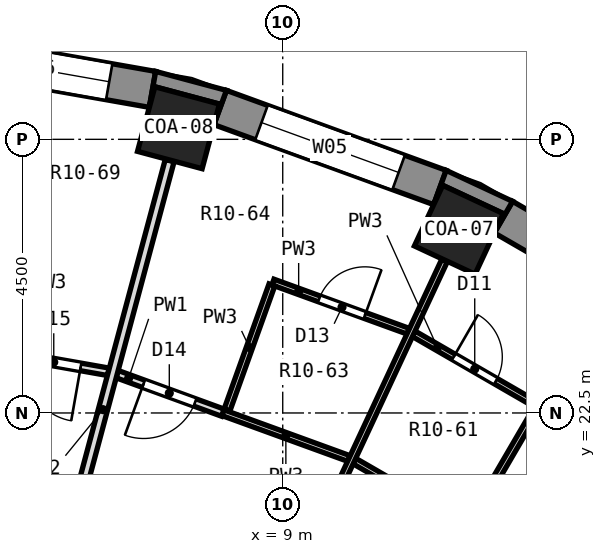
"""IFC4 building model, lengths in metres.
Left out: names, types, materials, properties, quantities, classifications, styles, units other than length and angle.
Written with IfcOpenShell. Run it as: python <this file> out.ifc"""

import sys

from ifc_helpers import new_model, si_unit, direction, frame, frame_2d, origin, origin_2d, place, context, subcontext, project, spatial, polyline, rectangle, outline, extrude, element, fill, save


model = new_model("IFC4")
c1 = context("Model", 3, precision=1e-05, world=origin(), true_north=direction((0.0, 1.0)))
c2 = subcontext(c1, "Body", "Model", "MODEL_VIEW")
j1 = project(units=[si_unit("LENGTHUNIT", "METRE"), si_unit("PLANEANGLEUNIT", "RADIAN")], contexts=[c1])
p1 = place(None, origin())
s1 = spatial("IfcSite", under=j1, at=p1, CompositionType="ELEMENT")
p2 = place(p1, origin())
s2 = spatial("IfcBuilding", under=s1, at=p2, CompositionType="ELEMENT")
p3 = place(p2, frame((0.0, 0.0, 36.2)))
s3 = spatial("IfcBuildingStorey", under=s2, at=p3, CompositionType="ELEMENT", Elevation=36.2)
for number, where, z_axis, x_axis in (
    (1, (11.897, 25.512, 0.0), (0.0, 0.0, 1.0), (0.423, 0.906, 0.0)),
    (2, (7.286, 27.191, 0.0), (0.0, 0.0, 1.0), (0.259, 0.966, 0.0)),
):
    element("IfcColumn", number, at=place(p3, frame(where, z_axis=z_axis, x_axis=x_axis)), inside=s3, PredefinedType="COLUMN", context=c2, shape_type="SweptSolid", body=[
        extrude(rectangle(XDim=1.1, YDim=1.1, at=origin_2d()), origin(), (0.0, 0.0, 1.0), 3.3),
    ])
p4 = place(p3, frame((15.96, 23.798, 0.0), z_axis=(0.0, 0.0, 1.0), x_axis=(-0.86603124159, 0.499989888488, 0.0)))
e3 = element("IfcWall", 3, at=p4, inside=s3, PredefinedType="SOLIDWALL", context=c2, shape_type="SweptSolid", body=[
    extrude(rectangle(XDim=3.846, YDim=0.6, at=frame_2d((1.923, 0.0))), origin(), (0.0, 0.0, 1.0), 2.75),
])
p5 = place(p4, frame((0.723, 0.0, 0.9)))
e4 = element("IfcOpeningElement", 4, at=p5, cuts=e3, PredefinedType="OPENING", context=c2, shape_type="SweptSolid", body=[
    extrude(rectangle(XDim=2.4, YDim=1.8, at=frame_2d((1.2, 0.9))), frame((0.0, 0.312, 0.0), z_axis=(0.0, -1.0, 0.0), x_axis=(1.0, 0.0, 0.0)), (0.0, 0.0, 1.0), 0.624),
])
p6 = place(p3, frame((11.585, 26.208, 0.0), z_axis=(0.0, 0.0, 1.0), x_axis=(-0.939689588564, 0.342028474173, 0.0)))
e5 = element("IfcWall", 5, at=p6, inside=s3, PredefinedType="SOLIDWALL", context=c2, shape_type="SweptSolid", body=[
    extrude(rectangle(XDim=3.846, YDim=0.6, at=frame_2d((1.923, 0.0))), origin(), (0.0, 0.0, 1.0), 2.75),
])
p7 = place(p6, frame((0.723, 0.0, 0.9)))
e6 = element("IfcOpeningElement", 6, at=p7, cuts=e5, PredefinedType="OPENING", context=c2, shape_type="SweptSolid", body=[
    extrude(rectangle(XDim=2.4, YDim=1.8, at=frame_2d((1.2, 0.9))), frame((0.0, 0.312, 0.0), z_axis=(0.0, -1.0, 0.0), x_axis=(1.0, 0.0, 0.0)), (0.0, 0.0, 1.0), 0.624),
])
p8 = place(p3, frame((6.858, 27.821, 0.0), z_axis=(0.0, 0.0, 1.0), x_axis=(-0.984800809218, 0.173687553279, 0.0)))
e7 = element("IfcWall", 7, at=p8, inside=s3, PredefinedType="SOLIDWALL", context=c2, shape_type="SweptSolid", body=[
    extrude(rectangle(XDim=3.846, YDim=0.6, at=frame_2d((1.923, 0.0))), origin(), (0.0, 0.0, 1.0), 2.75),
])
p9 = place(p8, frame((0.723, 0.0, 0.9)))
e8 = element("IfcOpeningElement", 8, at=p9, cuts=e7, PredefinedType="OPENING", context=c2, shape_type="SweptSolid", body=[
    extrude(rectangle(XDim=2.4, YDim=1.8, at=frame_2d((1.2, 0.9))), frame((0.0, 0.312, 0.0), z_axis=(0.0, -1.0, 0.0), x_axis=(1.0, 0.0, 0.0)), (0.0, 0.0, 1.0), 0.624),
])
p10 = place(p3, origin())
e9 = element("IfcWall", 9, at=p10, inside=s3, PredefinedType="SOLIDWALL", context=c2, shape_type="SweptSolid", body=[
    extrude(outline(polyline([(11.688, 26.49), (11.483, 25.926), (11.631, 26.243), (12.628, 25.779), (12.479, 25.461), (12.78, 25.981), (11.688, 26.49)])), origin(), (0.0, 0.0, 1.0), 2.75),
])
p11 = place(p3, origin())
e10 = element("IfcWall", 10, at=p11, inside=s3, PredefinedType="SOLIDWALL", context=c2, shape_type="SweptSolid", body=[
    extrude(outline(polyline([(6.91, 28.117), (6.806, 27.526), (6.897, 27.865), (7.959, 27.58), (7.869, 27.241), (8.074, 27.805), (6.91, 28.117)])), origin(), (0.0, 0.0, 1.0), 2.75),
])
p12 = place(p3, frame((10.178, 21.709, 0.0), z_axis=(0.0, 0.0, 1.0), x_axis=(0.865986508459, -0.50006736263, 0.0)))
e11 = element("IfcWall", 11, at=p12, inside=s3, PredefinedType="PARTITIONING", context=c2, shape_type="SweptSolid", body=[
    extrude(rectangle(XDim=2.206, YDim=0.1, at=frame_2d((1.103, 0.0))), origin(), (0.0, 0.0, 1.0), 2.75),
])
p13 = place(p3, frame((11.154, 23.802, 0.0), z_axis=(0.0, 0.0, 1.0), x_axis=(0.865910737143, -0.500198555877, 0.0)))
e12 = element("IfcWall", 12, at=p13, inside=s3, PredefinedType="PARTITIONING", context=c2, shape_type="SweptSolid", body=[
    extrude(rectangle(XDim=2.367, YDim=0.1, at=frame_2d((1.184, 0.0))), origin(), (0.0, 0.0, 1.0), 2.75),
])
p14 = place(p13, frame((0.759, 0.0, 0.0)))
e13 = element("IfcOpeningElement", 13, at=p14, cuts=e12, PredefinedType="OPENING", context=c2, shape_type="SweptSolid", body=[
    extrude(rectangle(XDim=0.8, YDim=2.1, at=frame_2d((0.4, 1.05))), frame((0.0, 0.062, 0.0), z_axis=(0.0, -1.0, 0.0), x_axis=(1.0, 0.0, 0.0)), (0.0, 0.0, 1.0), 0.124),
])
p15 = place(p3, frame((8.015, 22.505, 0.0), z_axis=(0.0, 0.0, 1.0), x_axis=(0.939744943051, -0.341876354856, 0.0)))
e14 = element("IfcWall", 14, at=p15, inside=s3, PredefinedType="PARTITIONING", context=c2, shape_type="SweptSolid", body=[
    extrude(rectangle(XDim=2.206, YDim=0.1, at=frame_2d((1.103, 0.0))), origin(), (0.0, 0.0, 1.0), 2.75),
])
p16 = place(p3, frame((6.278, 23.138, 0.0), z_axis=(0.0, 0.0, 1.0), x_axis=(0.939538772486, -0.34244254262, 0.0)))
e15 = element("IfcWall", 15, at=p16, inside=s3, PredefinedType="PARTITIONING", context=c2, shape_type="SweptSolid", body=[
    extrude(rectangle(XDim=1.849, YDim=0.125, at=frame_2d((0.925, 0.0))), origin(), (0.0, 0.0, 1.0), 2.75),
])
p17 = place(p16, frame((0.462, 0.0, 0.0)))
e16 = element("IfcOpeningElement", 16, at=p17, cuts=e15, PredefinedType="OPENING", context=c2, shape_type="SweptSolid", body=[
    extrude(rectangle(XDim=0.9, YDim=2.1, at=frame_2d((0.45, 1.05))), frame((0.0, 0.074, 0.0), z_axis=(0.0, -1.0, 0.0), x_axis=(1.0, 0.0, 0.0)), (0.0, 0.0, 1.0), 0.149),
])
p18 = place(p3, frame((8.839, 24.653, 0.0), z_axis=(0.0, 0.0, 1.0), x_axis=(0.939787401385, -0.341759623416, 0.0)))
e17 = element("IfcWall", 17, at=p18, inside=s3, PredefinedType="PARTITIONING", context=c2, shape_type="SweptSolid", body=[
    extrude(rectangle(XDim=2.367, YDim=0.1, at=frame_2d((1.184, 0.0))), origin(), (0.0, 0.0, 1.0), 2.75),
])
p19 = place(p18, frame((0.809, 0.0, 0.0)))
e18 = element("IfcOpeningElement", 18, at=p19, cuts=e17, PredefinedType="OPENING", context=c2, shape_type="SweptSolid", body=[
    extrude(rectangle(XDim=0.8, YDim=2.1, at=frame_2d((0.4, 1.05))), frame((0.0, 0.062, 0.0), z_axis=(0.0, -1.0, 0.0), x_axis=(1.0, 0.0, 0.0)), (0.0, 0.0, 1.0), 0.124),
])
p20 = place(p3, frame((4.311, 23.498, 0.0), z_axis=(0.0, 0.0, 1.0), x_axis=(0.984802153769, -0.173679929558, 0.0)))
e19 = element("IfcWall", 19, at=p20, inside=s3, PredefinedType="PARTITIONING", context=c2, shape_type="SweptSolid", body=[
    extrude(rectangle(XDim=1.85, YDim=0.125, at=frame_2d((0.925, 0.0))), origin(), (0.0, 0.0, 1.0), 2.75),
])
p21 = place(p20, frame((0.488, 0.0, 0.0)))
e20 = element("IfcOpeningElement", 20, at=p21, cuts=e19, PredefinedType="OPENING", context=c2, shape_type="SweptSolid", body=[
    extrude(rectangle(XDim=0.9, YDim=2.1, at=frame_2d((0.45, 1.05))), frame((0.0, 0.074, 0.0), z_axis=(0.0, -1.0, 0.0), x_axis=(1.0, 0.0, 0.0)), (0.0, 0.0, 1.0), 0.149),
])
p22 = place(p3, frame((12.076, 20.685, 0.0), z_axis=(0.0, 0.0, 1.0), x_axis=(0.503871025524, 0.863778900898, 0.0)))
e21 = element("IfcWall", 21, at=p22, inside=s3, PredefinedType="PARTITIONING", context=c2, shape_type="SweptSolid", body=[
    extrude(rectangle(XDim=2.188, YDim=0.1, at=frame_2d((1.094, 0.0))), origin(), (0.0, 0.0, 1.0), 2.75),
])
p23 = place(p3, frame((7.835, 16.796, 0.0), z_axis=(0.0, 0.0, 1.0), x_axis=(0.422351185038, 0.906432279046, 0.0)))
e22 = element("IfcWall", 22, at=p23, inside=s3, PredefinedType="PARTITIONING", context=c2, shape_type="SweptSolid", body=[
    extrude(rectangle(XDim=9.057, YDim=0.1, at=frame_2d((4.528, 0.0))), origin(), (0.0, 0.0, 1.0), 2.75),
])
p24 = place(p23, frame((2.243, 0.0, 0.0)))
e23 = element("IfcOpeningElement", 23, at=p24, cuts=e22, PredefinedType="OPENING", context=c2, shape_type="SweptSolid", body=[
    extrude(rectangle(XDim=0.9, YDim=2.1, at=frame_2d((0.45, 1.05))), frame((0.0, 0.062, 0.0), z_axis=(0.0, -1.0, 0.0), x_axis=(1.0, 0.0, 0.0)), (0.0, 0.0, 1.0), 0.124),
])
p25 = place(p3, frame((8.083, 22.547, 0.0), z_axis=(0.0, 0.0, 1.0), x_axis=(0.337806451735, 0.9412155976, 0.0)))
e24 = element("IfcWall", 24, at=p25, inside=s3, PredefinedType="PARTITIONING", context=c2, shape_type="SweptSolid", body=[
    extrude(rectangle(XDim=2.188, YDim=0.1, at=frame_2d((1.094, 0.0))), origin(), (0.0, 0.0, 1.0), 2.75),
])
p26 = place(p3, frame((4.947, 18.46, 0.0), z_axis=(0.0, 0.0, 1.0), x_axis=(0.258782623342, 0.965935584734, 0.0)))
e25 = element("IfcWall", 25, at=p26, inside=s3, PredefinedType="PARTITIONING", context=c2, shape_type="SweptSolid", body=[
    extrude(rectangle(XDim=8.479, YDim=0.15, at=frame_2d((4.239, 0.0))), origin(), (0.0, 0.0, 1.0), 2.75),
])
p27 = place(p7, origin())
e26 = element("IfcWindow", 26, at=p27, inside=s3, PartitioningType="SINGLE_PANEL", PredefinedType="WINDOW", context=c2, shape_type="SweptSolid", body=[
    extrude(rectangle(XDim=2.4, YDim=1.8, at=frame_2d((1.2, 0.9))), frame((0.0, 0.18, 0.0), z_axis=(0.0, -1.0, 0.0), x_axis=(1.0, 0.0, 0.0)), (0.0, 0.0, 1.0), 0.06),
])
fill(e6, e26)
p28 = place(p9, origin())
e27 = element("IfcWindow", 27, at=p28, inside=s3, PartitioningType="SINGLE_PANEL", PredefinedType="WINDOW", context=c2, shape_type="SweptSolid", body=[
    extrude(rectangle(XDim=2.4, YDim=1.8, at=frame_2d((1.2, 0.9))), frame((0.0, 0.18, 0.0), z_axis=(0.0, -1.0, 0.0), x_axis=(1.0, 0.0, 0.0)), (0.0, 0.0, 1.0), 0.06),
])
fill(e8, e27)
p29 = place(p14, origin())
e28 = element("IfcDoor", 28, at=p29, inside=s3, OperationType="SINGLE_SWING_LEFT", PredefinedType="DOOR", context=c2, shape_type="SweptSolid", body=[
    extrude(rectangle(XDim=0.8, YDim=2.1, at=frame_2d((0.4, 1.05))), frame((0.0, 0.025, 0.0), z_axis=(0.0, -1.0, 0.0), x_axis=(1.0, 0.0, 0.0)), (0.0, 0.0, 1.0), 0.05),
])
fill(e13, e28)
p30 = place(p19, origin())
e29 = element("IfcDoor", 29, at=p30, inside=s3, OperationType="SINGLE_SWING_RIGHT", PredefinedType="DOOR", context=c2, shape_type="SweptSolid", body=[
    extrude(rectangle(XDim=0.8, YDim=2.1, at=frame_2d((0.4, 1.05))), frame((0.0, 0.025, 0.0), z_axis=(0.0, -1.0, 0.0), x_axis=(1.0, 0.0, 0.0)), (0.0, 0.0, 1.0), 0.05),
])
fill(e18, e29)
p31 = place(p17, frame((0.9, 0.0, 0.0), z_axis=(0.0, 0.0, 1.0), x_axis=(-1.0, 0.0, 0.0)))
e30 = element("IfcDoor", 30, at=p31, inside=s3, OperationType="SINGLE_SWING_RIGHT", PredefinedType="DOOR", context=c2, shape_type="SweptSolid", body=[
    extrude(rectangle(XDim=0.9, YDim=2.1, at=frame_2d((0.45, 1.05))), frame((0.0, 0.025, 0.0), z_axis=(0.0, -1.0, 0.0), x_axis=(1.0, 0.0, 0.0)), (0.0, 0.0, 1.0), 0.05),
])
fill(e16, e30)
p32 = place(p21, frame((0.9, 0.0, 0.0), z_axis=(0.0, 0.0, 1.0), x_axis=(-1.0, 0.0, 0.0)))
e31 = element("IfcDoor", 31, at=p32, inside=s3, OperationType="SINGLE_SWING_LEFT", PredefinedType="DOOR", context=c2, shape_type="SweptSolid", body=[
    extrude(rectangle(XDim=0.9, YDim=2.1, at=frame_2d((0.45, 1.05))), frame((0.0, 0.025, 0.0), z_axis=(0.0, -1.0, 0.0), x_axis=(1.0, 0.0, 0.0)), (0.0, 0.0, 1.0), 0.05),
])
fill(e20, e31)
save(model, sys.argv[1])
